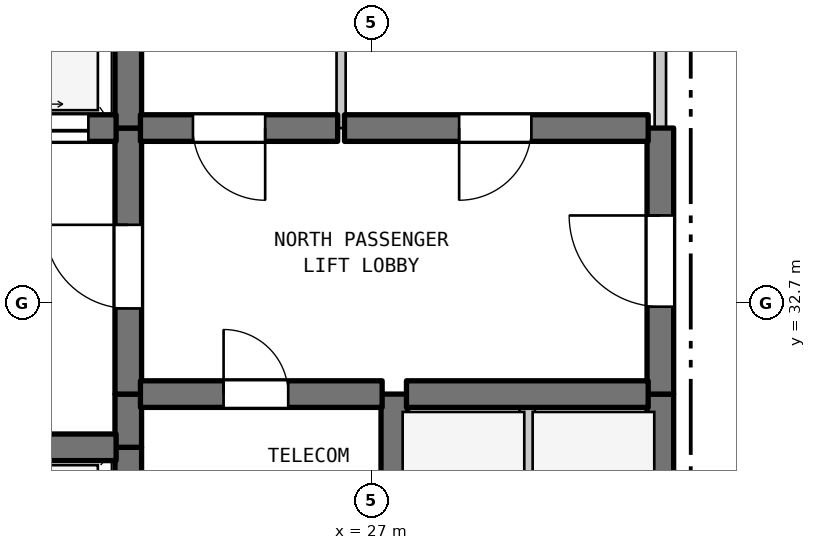
"""IFC4 building model, lengths in metres.
Left out: names, types, materials, properties, quantities, classifications, styles, units other than length and angle.
Written with IfcOpenShell. Run it as: python <this file> out.ifc"""

import sys

from ifc_helpers import new_model, si_unit, direction, frame, frame_2d, origin, place, context, subcontext, project, spatial, rectangle, extrude, element, fill, save


model = new_model("IFC4")
c1 = context("Model", 3, precision=1e-05, world=origin(), true_north=direction((0.0, 1.0)))
c2 = subcontext(c1, "Body", "Model", "MODEL_VIEW")
j1 = project(units=[si_unit("LENGTHUNIT", "METRE"), si_unit("PLANEANGLEUNIT", "RADIAN")], contexts=[c1])
p1 = place(None, origin())
s1 = spatial("IfcSite", under=j1, at=p1, CompositionType="ELEMENT")
p2 = place(p1, origin())
s2 = spatial("IfcBuilding", under=s1, at=p2, CompositionType="ELEMENT")
p3 = place(p2, frame((0.0, 0.0, 192.1)))
s3 = spatial("IfcBuildingStorey", under=s2, at=p3, CompositionType="ELEMENT", Elevation=192.1)
p4 = place(p3, frame((23.8, 29.5, 0.0), z_axis=(0.0, 0.0, 1.0), x_axis=(0.0, 1.0, 0.0)))
e1 = element("IfcWall", 1, at=p4, inside=s3, PredefinedType="SHEAR", context=c2, shape_type="SweptSolid", body=[
    extrude(rectangle(XDim=1.3, YDim=0.35, at=frame_2d((0.65, 0.0))), origin(), (0.0, 0.0, 1.0), 3.39),
])
p5 = place(p3, frame((23.8, 30.8, 0.0), z_axis=(0.0, 0.0, 1.0), x_axis=(0.0, 1.0, 0.0)))
e2 = element("IfcWall", 2, at=p5, inside=s3, PredefinedType="SHEAR", context=c2, shape_type="SweptSolid", body=[
    extrude(rectangle(XDim=0.7, YDim=0.35, at=frame_2d((0.35, 0.0))), origin(), (0.0, 0.0, 1.0), 3.39),
])
p6 = place(p3, frame((23.8, 31.5, 0.0), z_axis=(0.0, 0.0, 1.0), x_axis=(0.0, 1.0, 0.0)))
e3 = element("IfcWall", 3, at=p6, inside=s3, PredefinedType="SHEAR", context=c2, shape_type="SweptSolid", body=[
    extrude(rectangle(XDim=3.5, YDim=0.35, at=frame_2d((1.75, 0.0))), origin(), (0.0, 0.0, 1.0), 3.39),
])
p7 = place(p6, frame((1.127, 0.0, 0.0)))
e4 = element("IfcOpeningElement", 4, at=p7, cuts=e3, PredefinedType="OPENING", context=c2, shape_type="SweptSolid", body=[
    extrude(rectangle(XDim=1.1, YDim=2.15, at=frame_2d((0.55, 1.075))), frame((0.0, 0.185, 0.0), z_axis=(0.0, -1.0, 0.0), x_axis=(1.0, 0.0, 0.0)), (0.0, 0.0, 1.0), 0.37),
])
p8 = place(p3, frame((23.8, 35.0, 0.0), z_axis=(0.0, 0.0, 1.0), x_axis=(0.0, 1.0, 0.0)))
e5 = element("IfcWall", 5, at=p8, inside=s3, PredefinedType="SHEAR", context=c2, shape_type="SweptSolid", body=[
    extrude(rectangle(XDim=2.9, YDim=0.35, at=frame_2d((1.45, 0.0))), origin(), (0.0, 0.0, 1.0), 3.39),
])
p9 = place(p3, frame((26.6, 35.0, 0.0), z_axis=(0.0, 0.0, 1.0), x_axis=(0.0, 1.0, 0.0)))
e6 = element("IfcWall", 6, at=p9, inside=s3, PredefinedType="PARTITIONING", context=c2, shape_type="SweptSolid", body=[
    extrude(rectangle(XDim=2.9, YDim=0.12, at=frame_2d((1.45, 0.0))), origin(), (0.0, 0.0, 1.0), 3.39),
])
p10 = place(p3, frame((27.3, 29.5, 0.0), z_axis=(0.0, 0.0, 1.0), x_axis=(0.0, 1.0, 0.0)))
e7 = element("IfcWall", 7, at=p10, inside=s3, PredefinedType="SHEAR", context=c2, shape_type="SweptSolid", body=[
    extrude(rectangle(XDim=2.0, YDim=0.35, at=frame_2d((1.0, 0.0))), origin(), (0.0, 0.0, 1.0), 3.39),
])
p11 = place(p3, frame((29.05, 28.9, 0.0), z_axis=(0.0, 0.0, 1.0), x_axis=(0.0, 1.0, 0.0)))
e8 = element("IfcWall", 8, at=p11, inside=s3, PredefinedType="STANDARD", context=c2, shape_type="SweptSolid", body=[
    extrude(rectangle(XDim=2.6, YDim=0.2, at=frame_2d((1.3, 0.0))), origin(), (0.0, 0.0, 1.0), 3.39),
])
p12 = place(p3, frame((30.8, 28.9, 0.0), z_axis=(0.0, 0.0, 1.0), x_axis=(0.0, 1.0, 0.0)))
e9 = element("IfcWall", 9, at=p12, inside=s3, PredefinedType="SHEAR", context=c2, shape_type="SweptSolid", body=[
    extrude(rectangle(XDim=2.6, YDim=0.35, at=frame_2d((1.3, 0.0))), origin(), (0.0, 0.0, 1.0), 3.39),
])
p13 = place(p3, frame((30.8, 31.5, 0.0), z_axis=(0.0, 0.0, 1.0), x_axis=(0.0, 1.0, 0.0)))
e10 = element("IfcWall", 10, at=p13, inside=s3, PredefinedType="SHEAR", context=c2, shape_type="SweptSolid", body=[
    extrude(rectangle(XDim=3.5, YDim=0.35, at=frame_2d((1.75, 0.0))), origin(), (0.0, 0.0, 1.0), 3.39),
])
p14 = place(p13, frame((1.15, 0.0, 0.0)))
e11 = element("IfcOpeningElement", 11, at=p14, cuts=e10, PredefinedType="OPENING", context=c2, shape_type="SweptSolid", body=[
    extrude(rectangle(XDim=1.2, YDim=2.2, at=frame_2d((0.6, 1.1))), frame((0.0, 0.185, 0.0), z_axis=(0.0, -1.0, 0.0), x_axis=(1.0, 0.0, 0.0)), (0.0, 0.0, 1.0), 0.37),
])
p15 = place(p3, frame((30.8, 35.0, 0.0), z_axis=(0.0, 0.0, 1.0), x_axis=(0.0, 1.0, 0.0)))
e12 = element("IfcWall", 12, at=p15, inside=s3, PredefinedType="STANDARD", context=c2, shape_type="SweptSolid", body=[
    extrude(rectangle(XDim=2.9, YDim=0.15, at=frame_2d((1.45, 0.0))), origin(), (0.0, 0.0, 1.0), 3.39),
])
p16 = place(p3, frame((19.16, 30.8, 0.0), z_axis=(0.0, 0.0, 1.0), x_axis=(1.0, 0.0, 0.0)))
e13 = element("IfcWall", 13, at=p16, inside=s3, PredefinedType="SHEAR", context=c2, shape_type="SweptSolid", body=[
    extrude(rectangle(XDim=4.48, YDim=0.35, at=frame_2d((2.24, 0.0))), origin(), (0.0, 0.0, 1.0), 3.39),
])
p17 = place(p3, frame((23.96, 31.5, 0.0), z_axis=(0.0, 0.0, 1.0), x_axis=(1.0, 0.0, 0.0)))
e14 = element("IfcWall", 14, at=p17, inside=s3, PredefinedType="SHEAR", context=c2, shape_type="SweptSolid", body=[
    extrude(rectangle(XDim=3.18, YDim=0.35, at=frame_2d((1.59, 0.0))), origin(), (0.0, 0.0, 1.0), 3.39),
])
p18 = place(p17, frame((1.094, 0.0, 0.0)))
e15 = element("IfcOpeningElement", 15, at=p18, cuts=e14, PredefinedType="OPENING", context=c2, shape_type="SweptSolid", body=[
    extrude(rectangle(XDim=0.85, YDim=2.1, at=frame_2d((0.425, 1.05))), frame((0.0, 0.185, 0.0), z_axis=(0.0, -1.0, 0.0), x_axis=(1.0, 0.0, 0.0)), (0.0, 0.0, 1.0), 0.37),
])
p19 = place(p3, frame((27.46, 31.5, 0.0), z_axis=(0.0, 0.0, 1.0), x_axis=(1.0, 0.0, 0.0)))
e16 = element("IfcWall", 16, at=p19, inside=s3, PredefinedType="SHEAR", context=c2, shape_type="SweptSolid", body=[
    extrude(rectangle(XDim=3.18, YDim=0.35, at=frame_2d((1.59, 0.0))), origin(), (0.0, 0.0, 1.0), 3.39),
])
p20 = place(p3, frame((19.16, 35.0, 0.0), z_axis=(0.0, 0.0, 1.0), x_axis=(1.0, 0.0, 0.0)))
e17 = element("IfcWall", 17, at=p20, inside=s3, PredefinedType="SHEAR", context=c2, shape_type="SweptSolid", body=[
    extrude(rectangle(XDim=4.48, YDim=0.35, at=frame_2d((2.24, 0.0))), origin(), (0.0, 0.0, 1.0), 3.39),
])
p21 = place(p20, frame((0.365, 0.0, 0.0)))
e18 = element("IfcOpeningElement", 18, at=p21, cuts=e17, PredefinedType="OPENING", context=c2, shape_type="SweptSolid", body=[
    extrude(rectangle(XDim=1.35, YDim=2.2, at=frame_2d((0.675, 1.1))), frame((0.0, 0.185, 0.0), z_axis=(0.0, -1.0, 0.0), x_axis=(1.0, 0.0, 0.0)), (0.0, 0.0, 1.0), 0.37),
])
p22 = place(p20, frame((2.765, 0.0, 0.0)))
e19 = element("IfcOpeningElement", 19, at=p22, cuts=e17, PredefinedType="OPENING", context=c2, shape_type="SweptSolid", body=[
    extrude(rectangle(XDim=1.35, YDim=2.2, at=frame_2d((0.675, 1.1))), frame((0.0, 0.185, 0.0), z_axis=(0.0, -1.0, 0.0), x_axis=(1.0, 0.0, 0.0)), (0.0, 0.0, 1.0), 0.37),
])
p23 = place(p3, frame((23.96, 35.0, 0.0), z_axis=(0.0, 0.0, 1.0), x_axis=(1.0, 0.0, 0.0)))
e20 = element("IfcWall", 20, at=p23, inside=s3, PredefinedType="SHEAR", context=c2, shape_type="SweptSolid", body=[
    extrude(rectangle(XDim=2.595, YDim=0.35, at=frame_2d((1.297, 0.0))), origin(), (0.0, 0.0, 1.0), 3.39),
])
p24 = place(p23, frame((0.691, 0.0, 0.0)))
e21 = element("IfcOpeningElement", 21, at=p24, cuts=e20, PredefinedType="OPENING", context=c2, shape_type="SweptSolid", body=[
    extrude(rectangle(XDim=0.95, YDim=2.15, at=frame_2d((0.475, 1.075))), frame((0.0, 0.185, 0.0), z_axis=(0.0, -1.0, 0.0), x_axis=(1.0, 0.0, 0.0)), (0.0, 0.0, 1.0), 0.37),
])
p25 = place(p3, frame((26.645, 35.0, 0.0), z_axis=(0.0, 0.0, 1.0), x_axis=(1.0, 0.0, 0.0)))
e22 = element("IfcWall", 22, at=p25, inside=s3, PredefinedType="SHEAR", context=c2, shape_type="SweptSolid", body=[
    extrude(rectangle(XDim=3.995, YDim=0.35, at=frame_2d((1.998, 0.0))), origin(), (0.0, 0.0, 1.0), 3.39),
])
p26 = place(p25, frame((1.508, 0.0, 0.0)))
e23 = element("IfcOpeningElement", 23, at=p26, cuts=e22, PredefinedType="OPENING", context=c2, shape_type="SweptSolid", body=[
    extrude(rectangle(XDim=0.95, YDim=2.15, at=frame_2d((0.475, 1.075))), frame((0.0, 0.185, 0.0), z_axis=(0.0, -1.0, 0.0), x_axis=(1.0, 0.0, 0.0)), (0.0, 0.0, 1.0), 0.37),
])
p27 = place(p7, origin())
e24 = element("IfcDoor", 24, at=p27, inside=s3, OperationType="SINGLE_SWING_RIGHT", PredefinedType="DOOR", context=c2, shape_type="SweptSolid", body=[
    extrude(rectangle(XDim=1.1, YDim=2.15, at=frame_2d((0.55, 1.075))), frame((0.0, 0.025, 0.0), z_axis=(0.0, -1.0, 0.0), x_axis=(1.0, 0.0, 0.0)), (0.0, 0.0, 1.0), 0.05),
])
fill(e4, e24)
p28 = place(p14, origin())
e25 = element("IfcDoor", 25, at=p28, inside=s3, OperationType="SINGLE_SWING_RIGHT", PredefinedType="DOOR", context=c2, shape_type="SweptSolid", body=[
    extrude(rectangle(XDim=1.2, YDim=2.2, at=frame_2d((0.6, 1.1))), frame((0.0, 0.025, 0.0), z_axis=(0.0, -1.0, 0.0), x_axis=(1.0, 0.0, 0.0)), (0.0, 0.0, 1.0), 0.05),
])
fill(e11, e25)
p29 = place(p18, origin())
e26 = element("IfcDoor", 26, at=p29, inside=s3, OperationType="SINGLE_SWING_LEFT", PredefinedType="DOOR", context=c2, shape_type="SweptSolid", body=[
    extrude(rectangle(XDim=0.85, YDim=2.1, at=frame_2d((0.425, 1.05))), frame((0.0, 0.025, 0.0), z_axis=(0.0, -1.0, 0.0), x_axis=(1.0, 0.0, 0.0)), (0.0, 0.0, 1.0), 0.05),
])
fill(e15, e26)
p30 = place(p22, origin())
e27 = element("IfcDoor", 27, at=p30, inside=s3, OperationType="DOUBLE_DOOR_SLIDING", PredefinedType="DOOR", context=c2, shape_type="SweptSolid", body=[
    extrude(rectangle(XDim=1.35, YDim=2.2, at=frame_2d((0.675, 1.1))), frame((0.0, 0.025, 0.0), z_axis=(0.0, -1.0, 0.0), x_axis=(1.0, 0.0, 0.0)), (0.0, 0.0, 1.0), 0.05),
])
fill(e19, e27)
p31 = place(p24, frame((0.95, 0.0, 0.0), z_axis=(0.0, 0.0, 1.0), x_axis=(-1.0, 0.0, 0.0)))
e28 = element("IfcDoor", 28, at=p31, inside=s3, OperationType="SINGLE_SWING_RIGHT", PredefinedType="DOOR", context=c2, shape_type="SweptSolid", body=[
    extrude(rectangle(XDim=0.95, YDim=2.15, at=frame_2d((0.475, 1.075))), frame((0.0, 0.025, 0.0), z_axis=(0.0, -1.0, 0.0), x_axis=(1.0, 0.0, 0.0)), (0.0, 0.0, 1.0), 0.05),
])
fill(e21, e28)
p32 = place(p26, frame((0.95, 0.0, 0.0), z_axis=(0.0, 0.0, 1.0), x_axis=(-1.0, 0.0, 0.0)))
e29 = element("IfcDoor", 29, at=p32, inside=s3, OperationType="SINGLE_SWING_LEFT", PredefinedType="DOOR", context=c2, shape_type="SweptSolid", body=[
    extrude(rectangle(XDim=0.95, YDim=2.15, at=frame_2d((0.475, 1.075))), frame((0.0, 0.025, 0.0), z_axis=(0.0, -1.0, 0.0), x_axis=(1.0, 0.0, 0.0)), (0.0, 0.0, 1.0), 0.05),
])
fill(e23, e29)
save(model, sys.argv[1])
